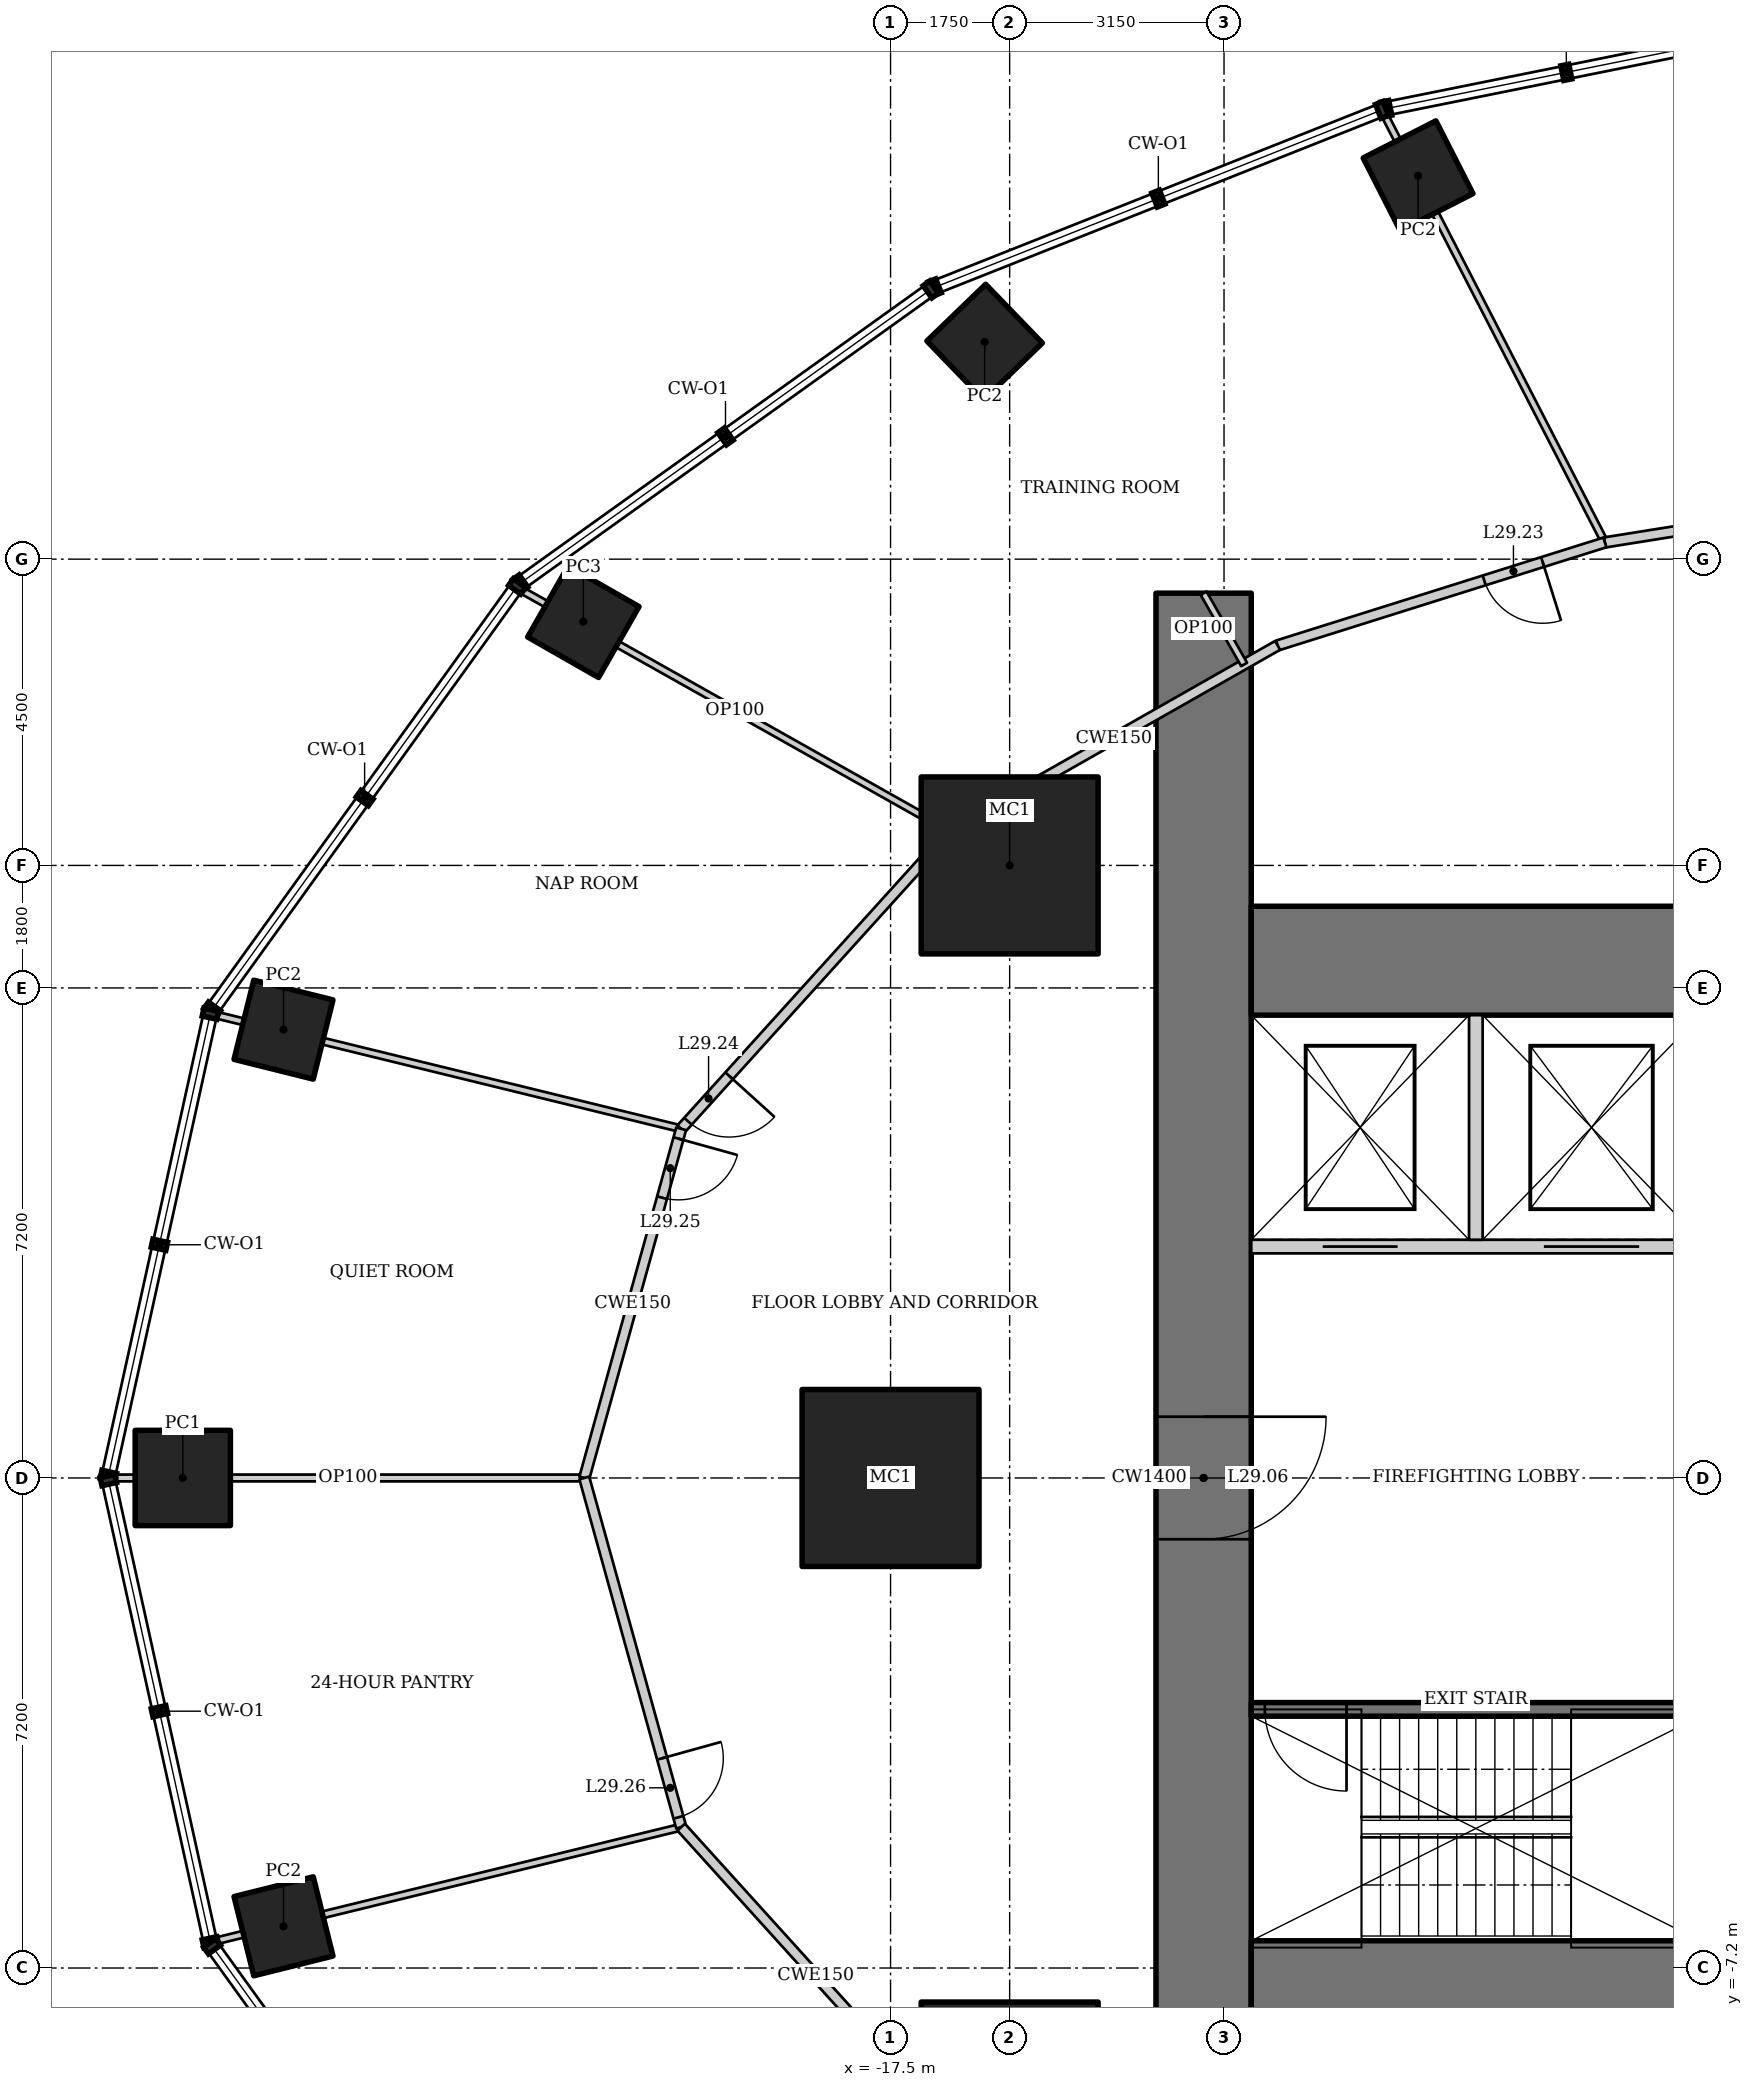
"""IFC4 building model, lengths in metres.
Left out: names, types, materials, properties, quantities, classifications, styles, units other than length and angle.
Written with IfcOpenShell. Run it as: python <this file> out.ifc"""

import sys

from ifc_helpers import new_model, si_unit, direction, frame, frame_2d, origin, origin_2d, place, context, subcontext, project, spatial, rectangle, hollow_rectangle, extrude, element, fill, save


model = new_model("IFC4")
c1 = context("Model", 3, precision=1e-05, world=origin(), true_north=direction((0.0, 1.0)))
c2 = subcontext(c1, "Body", "Model", "MODEL_VIEW")
j1 = project(units=[si_unit("LENGTHUNIT", "METRE"), si_unit("PLANEANGLEUNIT", "RADIAN")], contexts=[c1])
p1 = place(None, origin())
s1 = spatial("IfcSite", under=j1, at=p1, CompositionType="ELEMENT")
p2 = place(p1, origin())
s2 = spatial("IfcBuilding", under=s1, at=p2, CompositionType="ELEMENT")
p3 = place(p2, frame((0.0, 0.0, 125.8)))
s3 = spatial("IfcBuildingStorey", under=s2, at=p3, CompositionType="ELEMENT", Elevation=125.8)
for number, where, z_axis, x_axis in (
    (1, (-15.75, 9.0, 0.0), (0.0, 0.0, 1.0), (1.0, 0.0, 0.0)),
    (2, (-17.5, 0.0, 0.0), (0.0, 0.0, 1.0), (1.0, 0.0, 0.0)),
    (3, (-15.75, -9.0, 0.0), (0.0, 0.0, 1.0), (1.0, 0.0, 0.0)),
):
    element("IfcColumn", number, at=place(p3, frame(where, z_axis=z_axis, x_axis=x_axis)), inside=s3, PredefinedType="COLUMN", context=c2, shape_type="SweptSolid", body=[
        extrude(hollow_rectangle(XDim=2.6, YDim=2.6, WallThickness=0.13, at=origin_2d()), origin(), (0.0, 0.0, 1.0), 4.2),
    ])
for number, where, z_axis, x_axis in (
    (4, (-9.749, 19.133, 0.0), (0.0, 0.0, 1.0), (0.891, 0.454, 0.0)),
    (5, (-16.118, 16.69, 0.0), (0.0, 0.0, 1.0), (0.719, 0.695, 0.0)),
):
    element("IfcColumn", number, at=place(p3, frame(where, z_axis=z_axis, x_axis=x_axis)), inside=s3, PredefinedType="COLUMN", context=c2, shape_type="SweptSolid", body=[
        extrude(hollow_rectangle(XDim=1.2, YDim=1.2, WallThickness=0.1, at=origin_2d()), origin(), (0.0, 0.0, 1.0), 4.2),
    ])
p4 = place(p3, frame((-22.014, 12.579, 0.0), z_axis=(0.0, 0.0, 1.0), x_axis=(0.496139221777, 0.86824298017, 0.0)))
e6 = element("IfcColumn", 6, at=p4, inside=s3, PredefinedType="COLUMN", context=c2, shape_type="SweptSolid", body=[
    extrude(hollow_rectangle(XDim=1.2, YDim=1.2, WallThickness=0.12, at=origin_2d()), origin(), (0.0, 0.0, 1.0), 4.2),
])
p5 = place(p3, frame((-26.42, 6.587, 0.0), z_axis=(0.0, 0.0, 1.0), x_axis=(0.2419218956, 0.970295726276, 0.0)))
e7 = element("IfcColumn", 7, at=p5, inside=s3, PredefinedType="COLUMN", context=c2, shape_type="SweptSolid", body=[
    extrude(hollow_rectangle(XDim=1.2, YDim=1.2, WallThickness=0.1, at=origin_2d()), origin(), (0.0, 0.0, 1.0), 4.2),
])
p6 = place(p3, frame((-27.9, 0.0, 0.0), z_axis=(0.0, 0.0, 1.0), x_axis=(1.0, 0.0, 0.0)))
e8 = element("IfcColumn", 8, at=p6, inside=s3, PredefinedType="COLUMN", context=c2, shape_type="SweptSolid", body=[
    extrude(hollow_rectangle(XDim=1.4, YDim=1.4, WallThickness=0.1, at=origin_2d()), origin(), (0.0, 0.0, 1.0), 4.2),
])
p7 = place(p3, frame((-26.42, -6.587, 0.0), z_axis=(0.0, 0.0, 1.0), x_axis=(0.970295726276, 0.2419218956, 0.0)))
e9 = element("IfcColumn", 9, at=p7, inside=s3, PredefinedType="COLUMN", context=c2, shape_type="SweptSolid", body=[
    extrude(hollow_rectangle(XDim=1.2, YDim=1.2, WallThickness=0.1, at=origin_2d()), origin(), (0.0, 0.0, 1.0), 4.2),
])
p8 = place(p3, frame((-12.9, 13.0, 0.0), z_axis=(0.0, 0.0, 1.0), x_axis=(0.0, -1.0, 0.0)))
e10 = element("IfcWall", 10, at=p8, inside=s3, PredefinedType="SHEAR", context=c2, shape_type="SweptSolid", body=[
    extrude(rectangle(XDim=26.0, YDim=1.4, at=frame_2d((13.0, 0.0))), origin(), (0.0, 0.0, 1.0), 4.2),
])
p9 = place(p8, frame((12.1, 0.0, 0.0)))
e11 = element("IfcOpeningElement", 11, at=p9, cuts=e10, PredefinedType="OPENING", context=c2, shape_type="SweptSolid", body=[
    extrude(rectangle(XDim=1.8, YDim=2.1, at=frame_2d((0.9, 1.05))), frame((0.0, 0.71, 0.0), z_axis=(0.0, -1.0, 0.0), x_axis=(1.0, 0.0, 0.0)), (0.0, 0.0, 1.0), 1.42),
])
for number, where, z_axis, x_axis in (
    (12, (-12.2, -7.6, 0.0), (0.0, 0.0, 1.0), (1.0, 0.0, 0.0)),
    (13, (12.2, 7.6, 0.0), (0.0, 0.0, 1.0), (-1.0, 0.0, 0.0)),
):
    element("IfcWall", number, at=place(p3, frame(where, z_axis=z_axis, x_axis=x_axis)), inside=s3, PredefinedType="SHEAR", context=c2, shape_type="SweptSolid", body=[
        extrude(rectangle(XDim=24.4, YDim=1.6, at=frame_2d((12.2, 0.0))), origin(), (0.0, 0.0, 1.0), 4.2),
    ])
p10 = place(p3, frame((-5.6, -3.4, 0.0), z_axis=(0.0, 0.0, 1.0), x_axis=(-1.0, 0.0, 0.0)))
e14 = element("IfcWall", 14, at=p10, inside=s3, PredefinedType="SHEAR", context=c2, shape_type="SweptSolid", body=[
    extrude(rectangle(XDim=6.6, YDim=0.2, at=frame_2d((3.3, 0.0))), origin(), (0.0, 0.0, 1.0), 4.2),
])
p11 = place(p10, frame((5.2, 0.0, 0.0)))
e15 = element("IfcOpeningElement", 15, at=p11, cuts=e14, PredefinedType="OPENING", context=c2, shape_type="SweptSolid", body=[
    extrude(rectangle(XDim=1.2, YDim=2.1, at=frame_2d((0.6, 1.05))), frame((0.0, 0.11, 0.0), z_axis=(0.0, -1.0, 0.0), x_axis=(1.0, 0.0, 0.0)), (0.0, 0.0, 1.0), 0.22),
])
p12 = place(p3, frame((-12.2, 3.4, 0.0), z_axis=(0.0, 0.0, 1.0), x_axis=(1.0, 0.0, 0.0)))
e16 = element("IfcWall", 16, at=p12, inside=s3, PredefinedType="SOLIDWALL", context=c2, shape_type="SweptSolid", body=[
    extrude(rectangle(XDim=6.6, YDim=0.2, at=frame_2d((3.3, 0.0))), origin(), (0.0, 0.0, 1.0), 4.2),
])
p13 = place(p12, frame((1.05, 0.0, 0.0)))
e17 = element("IfcOpeningElement", 17, at=p13, cuts=e16, PredefinedType="OPENING", context=c2, shape_type="SweptSolid", body=[
    extrude(rectangle(XDim=1.1, YDim=2.2, at=frame_2d((0.55, 1.1))), frame((0.0, 0.11, 0.0), z_axis=(0.0, -1.0, 0.0), x_axis=(1.0, 0.0, 0.0)), (0.0, 0.0, 1.0), 0.22),
])
p14 = place(p12, frame((4.3, 0.0, 0.0)))
e18 = element("IfcOpeningElement", 18, at=p14, cuts=e16, PredefinedType="OPENING", context=c2, shape_type="SweptSolid", body=[
    extrude(rectangle(XDim=1.4, YDim=2.2, at=frame_2d((0.7, 1.1))), frame((0.0, 0.11, 0.0), z_axis=(0.0, -1.0, 0.0), x_axis=(1.0, 0.0, 0.0)), (0.0, 0.0, 1.0), 0.22),
])
p15 = place(p3, frame((-8.9, 3.5, 0.0), z_axis=(0.0, 0.0, 1.0), x_axis=(0.0, 1.0, 0.0)))
e19 = element("IfcWall", 19, at=p15, inside=s3, PredefinedType="SOLIDWALL", context=c2, shape_type="SweptSolid", body=[
    extrude(rectangle(XDim=3.3, YDim=0.2, at=frame_2d((1.65, 0.0))), origin(), (0.0, 0.0, 1.0), 4.2),
])
p16 = place(p3, frame((-10.253, 20.052, 0.0), z_axis=(0.0, 0.0, 1.0), x_axis=(0.458082677592, -0.888909590729, 0.0)))
e20 = element("IfcWall", 20, at=p16, inside=s3, PredefinedType="PARTITIONING", context=c2, shape_type="SweptSolid", body=[
    extrude(rectangle(XDim=7.094, YDim=0.1, at=frame_2d((3.547, 0.0))), origin(), (0.0, 0.0, 1.0), 3.349),
])
p17 = place(p3, frame((-22.949, 13.059, 0.0), z_axis=(0.0, 0.0, 1.0), x_axis=(0.871483913002, -0.490424091352, 0.0)))
e21 = element("IfcWall", 21, at=p17, inside=s3, PredefinedType="PARTITIONING", context=c2, shape_type="SweptSolid", body=[
    extrude(rectangle(XDim=7.26, YDim=0.1, at=frame_2d((3.63, 0.0))), origin(), (0.0, 0.0, 1.0), 3.45),
])
p18 = place(p3, frame((-27.441, 6.809, 0.0), z_axis=(0.0, 0.0, 1.0), x_axis=(0.971377572955, -0.237540755996, 0.0)))
e22 = element("IfcWall", 22, at=p18, inside=s3, PredefinedType="PARTITIONING", context=c2, shape_type="SweptSolid", body=[
    extrude(rectangle(XDim=7.066, YDim=0.1, at=frame_2d((3.533, 0.0))), origin(), (0.0, 0.0, 1.0), 3.113),
])
p19 = place(p3, frame((-28.944, 0.0, 0.0), z_axis=(0.0, 0.0, 1.0), x_axis=(1.0, 0.0, 0.0)))
e23 = element("IfcWall", 23, at=p19, inside=s3, PredefinedType="PARTITIONING", context=c2, shape_type="SweptSolid", body=[
    extrude(rectangle(XDim=6.944, YDim=0.1, at=frame_2d((3.472, 0.0))), origin(), (0.0, 0.0, 1.0), 3.204),
])
p20 = place(p3, frame((-27.441, -6.809, 0.0), z_axis=(0.0, 0.0, 1.0), x_axis=(0.971377572955, 0.237540755996, 0.0)))
e24 = element("IfcWall", 24, at=p20, inside=s3, PredefinedType="PARTITIONING", context=c2, shape_type="SweptSolid", body=[
    extrude(rectangle(XDim=7.066, YDim=0.1, at=frame_2d((3.533, 0.0))), origin(), (0.0, 0.0, 1.0), 3.113),
])
p21 = place(p3, frame((-3.31, 14.335, 0.0), z_axis=(0.0, 0.0, 1.0), x_axis=(-0.987511396594, -0.157547585181, 0.0)))
e25 = element("IfcWall", 25, at=p21, inside=s3, PredefinedType="PARTITIONING", context=c2, shape_type="SweptSolid", body=[
    extrude(rectangle(XDim=3.741, YDim=0.15, at=frame_2d((1.87, 0.0))), origin(), (0.0, 0.0, 1.0), 4.05),
])
p22 = place(p3, frame((-7.004, 13.746, 0.0), z_axis=(0.0, 0.0, 1.0), x_axis=(-0.953893934057, -0.300143903101, 0.0)))
e26 = element("IfcWall", 26, at=p22, inside=s3, PredefinedType="PARTITIONING", context=c2, shape_type="SweptSolid", body=[
    extrude(rectangle(XDim=5.042, YDim=0.15, at=frame_2d((2.521, 0.0))), origin(), (0.0, 0.0, 1.0), 4.05),
])
p23 = place(p22, frame((0.959, 0.0, 0.0)))
e27 = element("IfcOpeningElement", 27, at=p23, cuts=e26, PredefinedType="OPENING", context=c2, shape_type="SweptSolid", body=[
    extrude(rectangle(XDim=0.9, YDim=2.1, at=frame_2d((0.45, 1.05))), frame((0.0, 0.085, 0.0), z_axis=(0.0, -1.0, 0.0), x_axis=(1.0, 0.0, 0.0)), (0.0, 0.0, 1.0), 0.17),
])
p24 = place(p3, frame((-11.813, 12.232, 0.0), z_axis=(0.0, 0.0, 1.0), x_axis=(-0.869375991036, -0.494151177485, 0.0)))
e28 = element("IfcWall", 28, at=p24, inside=s3, PredefinedType="PARTITIONING", context=c2, shape_type="SweptSolid", body=[
    extrude(rectangle(XDim=5.532, YDim=0.15, at=frame_2d((2.766, 0.0))), origin(), (0.0, 0.0, 1.0), 4.05),
])
p25 = place(p3, frame((-16.623, 9.499, 0.0), z_axis=(0.0, 0.0, 1.0), x_axis=(-0.671118353743, -0.741350224435, 0.0)))
e29 = element("IfcWall", 29, at=p25, inside=s3, PredefinedType="PARTITIONING", context=c2, shape_type="SweptSolid", body=[
    extrude(rectangle(XDim=5.892, YDim=0.15, at=frame_2d((2.946, 0.0))), origin(), (0.0, 0.0, 1.0), 4.05),
])
p26 = place(p25, frame((4.842, 0.0, 0.0)))
e30 = element("IfcOpeningElement", 30, at=p26, cuts=e29, PredefinedType="OPENING", context=c2, shape_type="SweptSolid", body=[
    extrude(rectangle(XDim=0.9, YDim=2.1, at=frame_2d((0.45, 1.05))), frame((0.0, 0.085, 0.0), z_axis=(0.0, -1.0, 0.0), x_axis=(1.0, 0.0, 0.0)), (0.0, 0.0, 1.0), 0.17),
])
p27 = place(p3, frame((-20.577, 5.13, 0.0), z_axis=(0.0, 0.0, 1.0), x_axis=(-0.267293817428, -0.963615076244, 0.0)))
e31 = element("IfcWall", 31, at=p27, inside=s3, PredefinedType="PARTITIONING", context=c2, shape_type="SweptSolid", body=[
    extrude(rectangle(XDim=5.324, YDim=0.15, at=frame_2d((2.662, 0.0))), origin(), (0.0, 0.0, 1.0), 4.05),
])
p28 = place(p27, frame((0.15, 0.0, 0.0)))
e32 = element("IfcOpeningElement", 32, at=p28, cuts=e31, PredefinedType="OPENING", context=c2, shape_type="SweptSolid", body=[
    extrude(rectangle(XDim=0.9, YDim=2.1, at=frame_2d((0.45, 1.05))), frame((0.0, 0.085, 0.0), z_axis=(0.0, -1.0, 0.0), x_axis=(1.0, 0.0, 0.0)), (0.0, 0.0, 1.0), 0.17),
])
p29 = place(p3, frame((-22.0, 0.0, 0.0), z_axis=(0.0, 0.0, 1.0), x_axis=(0.267293817428, -0.963615076244, 0.0)))
e33 = element("IfcWall", 33, at=p29, inside=s3, PredefinedType="PARTITIONING", context=c2, shape_type="SweptSolid", body=[
    extrude(rectangle(XDim=5.324, YDim=0.15, at=frame_2d((2.662, 0.0))), origin(), (0.0, 0.0, 1.0), 4.05),
])
p30 = place(p29, frame((4.274, 0.0, 0.0)))
e34 = element("IfcOpeningElement", 34, at=p30, cuts=e33, PredefinedType="OPENING", context=c2, shape_type="SweptSolid", body=[
    extrude(rectangle(XDim=0.9, YDim=2.1, at=frame_2d((0.45, 1.05))), frame((0.0, 0.085, 0.0), z_axis=(0.0, -1.0, 0.0), x_axis=(1.0, 0.0, 0.0)), (0.0, 0.0, 1.0), 0.17),
])
p31 = place(p3, frame((-20.577, -5.13, 0.0), z_axis=(0.0, 0.0, 1.0), x_axis=(0.671118353743, -0.741350224435, 0.0)))
e35 = element("IfcWall", 35, at=p31, inside=s3, PredefinedType="PARTITIONING", context=c2, shape_type="SweptSolid", body=[
    extrude(rectangle(XDim=5.892, YDim=0.15, at=frame_2d((2.946, 0.0))), origin(), (0.0, 0.0, 1.0), 4.05),
])
p32 = place(p3, frame((-12.9, 13.0, 0.0), z_axis=(0.0, 0.0, 1.0), x_axis=(0.494173075358, -0.869363543974, 0.0)))
e36 = element("IfcWall", 36, at=p32, inside=s3, PredefinedType="PARTITIONING", context=c2, shape_type="SweptSolid", body=[
    extrude(rectangle(XDim=1.204, YDim=0.1, at=frame_2d((0.602, 0.0))), origin(), (0.0, 0.0, 1.0), 4.05),
])
p33 = place(p11, origin())
e37 = element("IfcDoor", 37, at=p33, inside=s3, OperationType="SINGLE_SWING_RIGHT", PredefinedType="DOOR", context=c2, shape_type="SweptSolid", body=[
    extrude(rectangle(XDim=1.2, YDim=2.1, at=frame_2d((0.6, 1.05))), frame((0.0, 0.025, 0.0), z_axis=(0.0, -1.0, 0.0), x_axis=(1.0, 0.0, 0.0)), (0.0, 0.0, 1.0), 0.05),
])
fill(e15, e37)
p34 = place(p9, origin())
e38 = element("IfcDoor", 38, at=p34, inside=s3, OperationType="DOUBLE_DOOR_DOUBLE_SWING", PredefinedType="DOOR", context=c2, shape_type="SweptSolid", body=[
    extrude(rectangle(XDim=1.8, YDim=2.1, at=frame_2d((0.9, 1.05))), frame((0.0, 0.025, 0.0), z_axis=(0.0, -1.0, 0.0), x_axis=(1.0, 0.0, 0.0)), (0.0, 0.0, 1.0), 0.05),
])
fill(e11, e38)
p35 = place(p13, origin())
e39 = element("IfcDoor", 39, at=p35, inside=s3, OperationType="DOUBLE_DOOR_SLIDING", PredefinedType="DOOR", context=c2, shape_type="SweptSolid", body=[
    extrude(rectangle(XDim=1.1, YDim=2.2, at=frame_2d((0.55, 1.1))), frame((0.0, 0.025, 0.0), z_axis=(0.0, -1.0, 0.0), x_axis=(1.0, 0.0, 0.0)), (0.0, 0.0, 1.0), 0.05),
])
fill(e17, e39)
p36 = place(p14, origin())
e40 = element("IfcDoor", 40, at=p36, inside=s3, OperationType="DOUBLE_DOOR_SLIDING", PredefinedType="DOOR", context=c2, shape_type="SweptSolid", body=[
    extrude(rectangle(XDim=1.4, YDim=2.2, at=frame_2d((0.7, 1.1))), frame((0.0, 0.025, 0.0), z_axis=(0.0, -1.0, 0.0), x_axis=(1.0, 0.0, 0.0)), (0.0, 0.0, 1.0), 0.05),
])
fill(e18, e40)
p37 = place(p23, origin())
e41 = element("IfcDoor", 41, at=p37, inside=s3, OperationType="SINGLE_SWING_LEFT", PredefinedType="DOOR", context=c2, shape_type="SweptSolid", body=[
    extrude(rectangle(XDim=0.9, YDim=2.1, at=frame_2d((0.45, 1.05))), frame((0.0, 0.025, 0.0), z_axis=(0.0, -1.0, 0.0), x_axis=(1.0, 0.0, 0.0)), (0.0, 0.0, 1.0), 0.05),
])
fill(e27, e41)
p38 = place(p26, origin())
e42 = element("IfcDoor", 42, at=p38, inside=s3, OperationType="SINGLE_SWING_LEFT", PredefinedType="DOOR", context=c2, shape_type="SweptSolid", body=[
    extrude(rectangle(XDim=0.9, YDim=2.1, at=frame_2d((0.45, 1.05))), frame((0.0, 0.025, 0.0), z_axis=(0.0, -1.0, 0.0), x_axis=(1.0, 0.0, 0.0)), (0.0, 0.0, 1.0), 0.05),
])
fill(e30, e42)
p39 = place(p28, origin())
e43 = element("IfcDoor", 43, at=p39, inside=s3, OperationType="SINGLE_SWING_LEFT", PredefinedType="DOOR", context=c2, shape_type="SweptSolid", body=[
    extrude(rectangle(XDim=0.9, YDim=2.1, at=frame_2d((0.45, 1.05))), frame((0.0, 0.025, 0.0), z_axis=(0.0, -1.0, 0.0), x_axis=(1.0, 0.0, 0.0)), (0.0, 0.0, 1.0), 0.05),
])
fill(e32, e43)
p40 = place(p30, origin())
e44 = element("IfcDoor", 44, at=p40, inside=s3, OperationType="SINGLE_SWING_LEFT", PredefinedType="DOOR", context=c2, shape_type="SweptSolid", body=[
    extrude(rectangle(XDim=0.9, YDim=2.1, at=frame_2d((0.45, 1.05))), frame((0.0, 0.025, 0.0), z_axis=(0.0, -1.0, 0.0), x_axis=(1.0, 0.0, 0.0)), (0.0, 0.0, 1.0), 0.05),
])
fill(e34, e44)
save(model, sys.argv[1])
